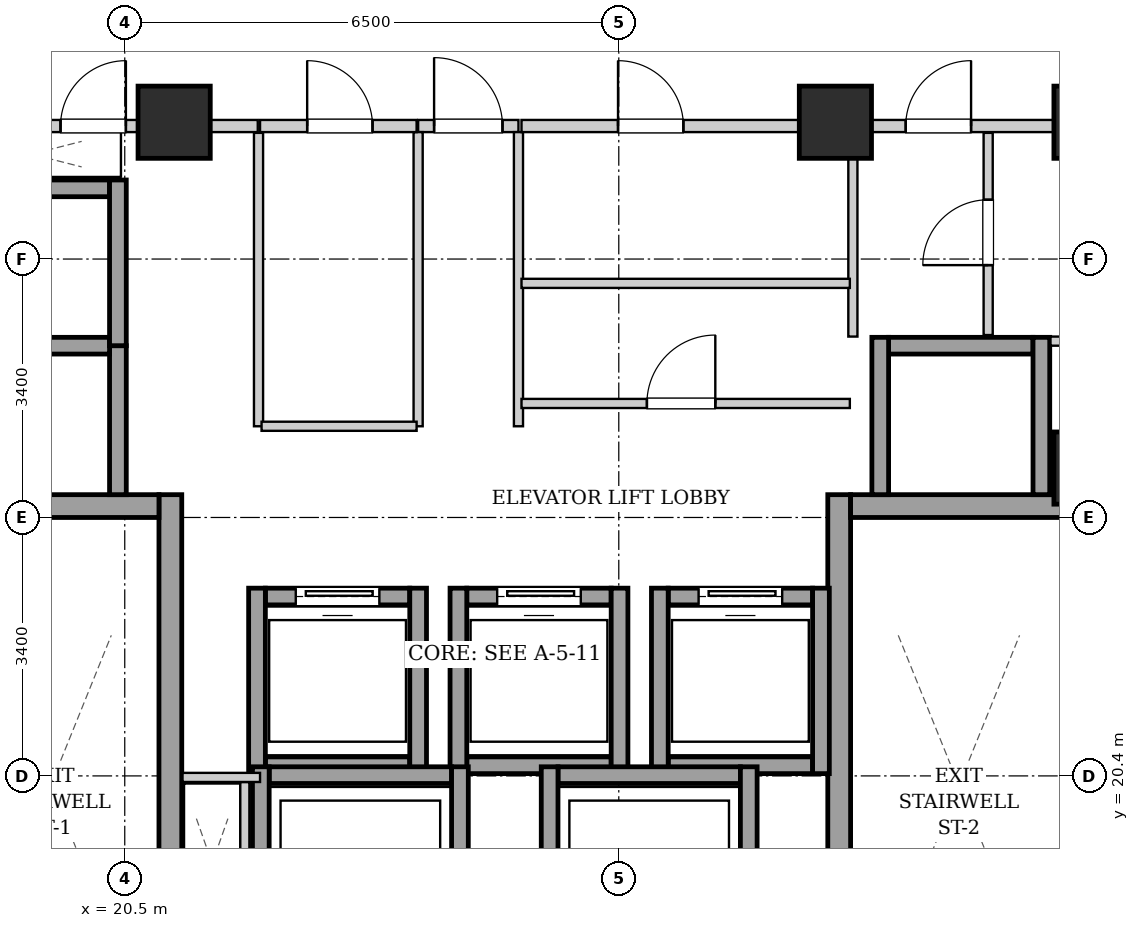
"""IFC4 building model, lengths in metres.
Left out: names, types, materials, properties, quantities, classifications, styles, units other than length and angle.
Written with IfcOpenShell. Run it as: python <this file> out.ifc"""

import sys

from ifc_helpers import new_model, si_unit, direction, frame, frame_2d, origin, origin_2d, place, context, subcontext, project, spatial, rectangle, extrude, element, fill, save


model = new_model("IFC4")
c1 = context("Model", 3, precision=1e-05, world=origin(), true_north=direction((0.0, 1.0)))
c2 = subcontext(c1, "Body", "Model", "MODEL_VIEW")
j1 = project(units=[si_unit("LENGTHUNIT", "METRE"), si_unit("PLANEANGLEUNIT", "RADIAN")], contexts=[c1])
p1 = place(None, origin())
s1 = spatial("IfcSite", under=j1, at=p1, CompositionType="ELEMENT")
p2 = place(p1, origin())
s2 = spatial("IfcBuilding", under=s1, at=p2, CompositionType="ELEMENT")
p3 = place(p2, frame((0.0, 0.0, 150.4)))
s3 = spatial("IfcBuildingStorey", under=s2, at=p3, CompositionType="ELEMENT", Elevation=150.4)
for number, where, z_axis, x_axis in (
    (1, (21.15, 29.0, 0.0), (0.0, 0.0, 1.0), (1.0, 0.0, 0.0)),
    (2, (29.85, 29.0, 0.0), (0.0, 0.0, 1.0), (1.0, 0.0, 0.0)),
    (3, (33.2, 29.0, 0.0), (0.0, 0.0, 1.0), (1.0, 0.0, 0.0)),
    (4, (33.2, 24.45, 0.0), (0.0, 0.0, 1.0), (1.0, 0.0, 0.0)),
):
    element("IfcColumn", number, at=place(p3, frame(where, z_axis=z_axis, x_axis=x_axis)), inside=s3, PredefinedType="COLUMN", context=c2, shape_type="SweptSolid", body=[
        extrude(rectangle(XDim=0.95, YDim=0.95, at=origin_2d()), origin(), (0.0, 0.0, 1.0), 3.25),
    ])
p4 = place(p3, frame((21.1, 15.1, 0.0), z_axis=(0.0, 0.0, 1.0), x_axis=(0.0, 1.0, 0.0)))
e5 = element("IfcWall", 5, at=p4, inside=s3, PredefinedType="SHEAR", context=c2, shape_type="SweptSolid", body=[
    extrude(rectangle(XDim=9.0, YDim=0.3, at=frame_2d((4.5, 0.0))), origin(), (0.0, 0.0, 1.0), 2.99),
])
p5 = place(p3, frame((18.1, 23.95, 0.0), z_axis=(0.0, 0.0, 1.0), x_axis=(1.0, 0.0, 0.0)))
e6 = element("IfcWall", 6, at=p5, inside=s3, PredefinedType="SHEAR", context=c2, shape_type="SweptSolid", body=[
    extrude(rectangle(XDim=2.85, YDim=0.3, at=frame_2d((1.425, 0.0))), origin(), (0.0, 0.0, 1.0), 2.99),
])
p6 = place(p3, frame((29.9, 15.1, 0.0), z_axis=(0.0, 0.0, 1.0), x_axis=(0.0, 1.0, 0.0)))
e7 = element("IfcWall", 7, at=p6, inside=s3, PredefinedType="SHEAR", context=c2, shape_type="SweptSolid", body=[
    extrude(rectangle(XDim=9.0, YDim=0.3, at=frame_2d((4.5, 0.0))), origin(), (0.0, 0.0, 1.0), 2.99),
])
p7 = place(p3, frame((30.05, 23.95, 0.0), z_axis=(0.0, 0.0, 1.0), x_axis=(1.0, 0.0, 0.0)))
e8 = element("IfcWall", 8, at=p7, inside=s3, PredefinedType="SHEAR", context=c2, shape_type="SweptSolid", body=[
    extrude(rectangle(XDim=2.85, YDim=0.3, at=frame_2d((1.425, 0.0))), origin(), (0.0, 0.0, 1.0), 2.99),
])
p8 = place(p3, frame((22.35, 20.54, 0.0), z_axis=(0.0, 0.0, 1.0), x_axis=(1.0, 0.0, 0.0)))
e9 = element("IfcWall", 9, at=p8, inside=s3, PredefinedType="SHEAR", context=c2, shape_type="SweptSolid", body=[
    extrude(rectangle(XDim=1.9, YDim=0.22, at=frame_2d((0.95, 0.0))), origin(), (0.0, 0.0, 1.0), 2.99),
])
p9 = place(p3, frame((22.35, 22.76, 0.0), z_axis=(0.0, 0.0, 1.0), x_axis=(1.0, 0.0, 0.0)))
e10 = element("IfcWall", 10, at=p9, inside=s3, PredefinedType="SHEAR", context=c2, shape_type="SweptSolid", body=[
    extrude(rectangle(XDim=1.9, YDim=0.22, at=frame_2d((0.95, 0.0))), origin(), (0.0, 0.0, 1.0), 2.99),
])
p10 = place(p9, frame((0.4, 0.0, 0.0)))
e11 = element("IfcOpeningElement", 11, at=p10, cuts=e10, PredefinedType="OPENING", context=c2, shape_type="SweptSolid", body=[
    extrude(rectangle(XDim=1.1, YDim=2.15, at=frame_2d((0.55, 1.075))), frame((0.0, 0.12, 0.0), z_axis=(0.0, -1.0, 0.0), x_axis=(1.0, 0.0, 0.0)), (0.0, 0.0, 1.0), 0.24),
])
for number, where, z_axis, x_axis in (
    (12, (22.24, 20.43, 0.0), (0.0, 0.0, 1.0), (0.0, 1.0, 0.0)),
    (13, (24.36, 20.43, 0.0), (0.0, 0.0, 1.0), (0.0, 1.0, 0.0)),
):
    element("IfcWall", number, at=place(p3, frame(where, z_axis=z_axis, x_axis=x_axis)), inside=s3, PredefinedType="SHEAR", context=c2, shape_type="SweptSolid", body=[
        extrude(rectangle(XDim=2.44, YDim=0.22, at=frame_2d((1.22, 0.0))), origin(), (0.0, 0.0, 1.0), 2.99),
    ])
p11 = place(p3, frame((25.0, 20.54, 0.0), z_axis=(0.0, 0.0, 1.0), x_axis=(1.0, 0.0, 0.0)))
e14 = element("IfcWall", 14, at=p11, inside=s3, PredefinedType="SHEAR", context=c2, shape_type="SweptSolid", body=[
    extrude(rectangle(XDim=1.9, YDim=0.22, at=frame_2d((0.95, 0.0))), origin(), (0.0, 0.0, 1.0), 2.99),
])
p12 = place(p3, frame((25.0, 22.76, 0.0), z_axis=(0.0, 0.0, 1.0), x_axis=(1.0, 0.0, 0.0)))
e15 = element("IfcWall", 15, at=p12, inside=s3, PredefinedType="SHEAR", context=c2, shape_type="SweptSolid", body=[
    extrude(rectangle(XDim=1.9, YDim=0.22, at=frame_2d((0.95, 0.0))), origin(), (0.0, 0.0, 1.0), 2.99),
])
p13 = place(p12, frame((0.4, 0.0, 0.0)))
e16 = element("IfcOpeningElement", 16, at=p13, cuts=e15, PredefinedType="OPENING", context=c2, shape_type="SweptSolid", body=[
    extrude(rectangle(XDim=1.1, YDim=2.15, at=frame_2d((0.55, 1.075))), frame((0.0, 0.12, 0.0), z_axis=(0.0, -1.0, 0.0), x_axis=(1.0, 0.0, 0.0)), (0.0, 0.0, 1.0), 0.24),
])
for number, where, z_axis, x_axis in (
    (17, (24.89, 20.43, 0.0), (0.0, 0.0, 1.0), (0.0, 1.0, 0.0)),
    (18, (27.01, 20.43, 0.0), (0.0, 0.0, 1.0), (0.0, 1.0, 0.0)),
):
    element("IfcWall", number, at=place(p3, frame(where, z_axis=z_axis, x_axis=x_axis)), inside=s3, PredefinedType="SHEAR", context=c2, shape_type="SweptSolid", body=[
        extrude(rectangle(XDim=2.44, YDim=0.22, at=frame_2d((1.22, 0.0))), origin(), (0.0, 0.0, 1.0), 2.99),
    ])
p14 = place(p3, frame((27.65, 20.54, 0.0), z_axis=(0.0, 0.0, 1.0), x_axis=(1.0, 0.0, 0.0)))
e19 = element("IfcWall", 19, at=p14, inside=s3, PredefinedType="SHEAR", context=c2, shape_type="SweptSolid", body=[
    extrude(rectangle(XDim=1.9, YDim=0.22, at=frame_2d((0.95, 0.0))), origin(), (0.0, 0.0, 1.0), 2.99),
])
p15 = place(p3, frame((27.65, 22.76, 0.0), z_axis=(0.0, 0.0, 1.0), x_axis=(1.0, 0.0, 0.0)))
e20 = element("IfcWall", 20, at=p15, inside=s3, PredefinedType="SHEAR", context=c2, shape_type="SweptSolid", body=[
    extrude(rectangle(XDim=1.9, YDim=0.22, at=frame_2d((0.95, 0.0))), origin(), (0.0, 0.0, 1.0), 2.99),
])
p16 = place(p15, frame((0.4, 0.0, 0.0)))
e21 = element("IfcOpeningElement", 21, at=p16, cuts=e20, PredefinedType="OPENING", context=c2, shape_type="SweptSolid", body=[
    extrude(rectangle(XDim=1.1, YDim=2.15, at=frame_2d((0.55, 1.075))), frame((0.0, 0.12, 0.0), z_axis=(0.0, -1.0, 0.0), x_axis=(1.0, 0.0, 0.0)), (0.0, 0.0, 1.0), 0.24),
])
for number, where, z_axis, x_axis in (
    (22, (27.54, 20.43, 0.0), (0.0, 0.0, 1.0), (0.0, 1.0, 0.0)),
    (23, (29.66, 20.43, 0.0), (0.0, 0.0, 1.0), (0.0, 1.0, 0.0)),
):
    element("IfcWall", number, at=place(p3, frame(where, z_axis=z_axis, x_axis=x_axis)), inside=s3, PredefinedType="SHEAR", context=c2, shape_type="SweptSolid", body=[
        extrude(rectangle(XDim=2.44, YDim=0.22, at=frame_2d((1.22, 0.0))), origin(), (0.0, 0.0, 1.0), 2.99),
    ])
p17 = place(p3, frame((20.41, 24.1, 0.0), z_axis=(0.0, 0.0, 1.0), x_axis=(0.0, 1.0, 0.0)))
e24 = element("IfcWall", 24, at=p17, inside=s3, PredefinedType="SHEAR", context=c2, shape_type="SweptSolid", body=[
    extrude(rectangle(XDim=1.96, YDim=0.22, at=frame_2d((0.98, 0.0))), origin(), (0.0, 0.0, 1.0), 2.99),
])
for number, where, z_axis, x_axis in (
    (25, (18.4, 26.06, 0.0), (0.0, 0.0, 1.0), (1.0, 0.0, 0.0)),
    (26, (18.4, 28.13, 0.0), (0.0, 0.0, 1.0), (1.0, 0.0, 0.0)),
):
    element("IfcWall", number, at=place(p3, frame(where, z_axis=z_axis, x_axis=x_axis)), inside=s3, PredefinedType="SHEAR", context=c2, shape_type="SweptSolid", body=[
        extrude(rectangle(XDim=1.9, YDim=0.22, at=frame_2d((0.95, 0.0))), origin(), (0.0, 0.0, 1.0), 2.99),
    ])
p18 = place(p3, frame((20.41, 26.06, 0.0), z_axis=(0.0, 0.0, 1.0), x_axis=(0.0, 1.0, 0.0)))
e27 = element("IfcWall", 27, at=p18, inside=s3, PredefinedType="SHEAR", context=c2, shape_type="SweptSolid", body=[
    extrude(rectangle(XDim=2.18, YDim=0.22, at=frame_2d((1.09, 0.0))), origin(), (0.0, 0.0, 1.0), 2.99),
])
p19 = place(p3, frame((30.55, 26.06, 0.0), z_axis=(0.0, 0.0, 1.0), x_axis=(1.0, 0.0, 0.0)))
e28 = element("IfcWall", 28, at=p19, inside=s3, PredefinedType="SHEAR", context=c2, shape_type="SweptSolid", body=[
    extrude(rectangle(XDim=1.9, YDim=0.22, at=frame_2d((0.95, 0.0))), origin(), (0.0, 0.0, 1.0), 2.99),
])
for number, where, z_axis, x_axis in (
    (29, (30.44, 24.1, 0.0), (0.0, 0.0, 1.0), (0.0, 1.0, 0.0)),
    (30, (32.56, 24.1, 0.0), (0.0, 0.0, 1.0), (0.0, 1.0, 0.0)),
):
    element("IfcWall", number, at=place(p3, frame(where, z_axis=z_axis, x_axis=x_axis)), inside=s3, PredefinedType="SHEAR", context=c2, shape_type="SweptSolid", body=[
        extrude(rectangle(XDim=2.07, YDim=0.22, at=frame_2d((1.035, 0.0))), origin(), (0.0, 0.0, 1.0), 2.99),
    ])
p20 = place(p3, frame((22.4, 20.41, 0.0), z_axis=(0.0, 0.0, 1.0), x_axis=(1.0, 0.0, 0.0)))
e31 = element("IfcWall", 31, at=p20, inside=s3, PredefinedType="SHEAR", context=c2, shape_type="SweptSolid", body=[
    extrude(rectangle(XDim=2.4, YDim=0.22, at=frame_2d((1.2, 0.0))), origin(), (0.0, 0.0, 1.0), 2.99),
])
for number, where, z_axis, x_axis in (
    (32, (22.29, 17.98, 0.0), (0.0, 0.0, 1.0), (0.0, 1.0, 0.0)),
    (33, (24.91, 17.98, 0.0), (0.0, 0.0, 1.0), (0.0, 1.0, 0.0)),
):
    element("IfcWall", number, at=place(p3, frame(where, z_axis=z_axis, x_axis=x_axis)), inside=s3, PredefinedType="SHEAR", context=c2, shape_type="SweptSolid", body=[
        extrude(rectangle(XDim=2.54, YDim=0.22, at=frame_2d((1.27, 0.0))), origin(), (0.0, 0.0, 1.0), 2.99),
    ])
p21 = place(p3, frame((26.2, 20.41, 0.0), z_axis=(0.0, 0.0, 1.0), x_axis=(1.0, 0.0, 0.0)))
e34 = element("IfcWall", 34, at=p21, inside=s3, PredefinedType="SHEAR", context=c2, shape_type="SweptSolid", body=[
    extrude(rectangle(XDim=2.4, YDim=0.22, at=frame_2d((1.2, 0.0))), origin(), (0.0, 0.0, 1.0), 2.99),
])
for number, where, z_axis, x_axis in (
    (35, (26.09, 17.98, 0.0), (0.0, 0.0, 1.0), (0.0, 1.0, 0.0)),
    (36, (28.71, 17.98, 0.0), (0.0, 0.0, 1.0), (0.0, 1.0, 0.0)),
):
    element("IfcWall", number, at=place(p3, frame(where, z_axis=z_axis, x_axis=x_axis)), inside=s3, PredefinedType="SHEAR", context=c2, shape_type="SweptSolid", body=[
        extrude(rectangle(XDim=2.54, YDim=0.22, at=frame_2d((1.27, 0.0))), origin(), (0.0, 0.0, 1.0), 2.99),
    ])
p22 = place(p3, frame((24.36, 28.95, 0.0), z_axis=(0.0, 0.0, 1.0), x_axis=(1.0, 0.0, 0.0)))
e37 = element("IfcWall", 37, at=p22, inside=s3, PredefinedType="PARTITIONING", context=c2, shape_type="SweptSolid", body=[
    extrude(rectangle(XDim=1.32, YDim=0.16, at=frame_2d((0.66, 0.0))), origin(), (0.0, 0.0, 1.0), 2.442),
])
p23 = place(p22, frame((0.21, 0.0, 0.0)))
e38 = element("IfcOpeningElement", 38, at=p23, cuts=e37, PredefinedType="OPENING", context=c2, shape_type="SweptSolid", body=[
    extrude(rectangle(XDim=0.9, YDim=2.05, at=frame_2d((0.45, 1.025))), frame((0.0, 0.09, 0.0), z_axis=(0.0, -1.0, 0.0), x_axis=(1.0, 0.0, 0.0)), (0.0, 0.0, 1.0), 0.18),
])
p24 = place(p3, frame((17.96, 28.95, 0.0), z_axis=(0.0, 0.0, 1.0), x_axis=(1.0, 0.0, 0.0)))
e39 = element("IfcWall", 39, at=p24, inside=s3, PredefinedType="PARTITIONING", context=c2, shape_type="SweptSolid", body=[
    extrude(rectangle(XDim=4.29, YDim=0.16, at=frame_2d((2.145, 0.0))), origin(), (0.0, 0.0, 1.0), 2.442),
])
p25 = place(p24, frame((1.695, 0.0, 0.0)))
e40 = element("IfcOpeningElement", 40, at=p25, cuts=e39, PredefinedType="OPENING", context=c2, shape_type="SweptSolid", body=[
    extrude(rectangle(XDim=0.86, YDim=2.05, at=frame_2d((0.43, 1.025))), frame((0.0, 0.09, 0.0), z_axis=(0.0, -1.0, 0.0), x_axis=(1.0, 0.0, 0.0)), (0.0, 0.0, 1.0), 0.18),
])
p26 = place(p3, frame((22.08, 18.2, 0.0), z_axis=(0.0, 0.0, 1.0), x_axis=(0.0, 1.0, 0.0)))
e41 = element("IfcWall", 41, at=p26, inside=s3, PredefinedType="PARTITIONING", context=c2, shape_type="SweptSolid", body=[
    extrude(rectangle(XDim=2.12, YDim=0.12, at=frame_2d((1.06, 0.0))), origin(), (0.0, 0.0, 1.0), 2.99),
])
p27 = place(p3, frame((22.28, 20.38, 0.0), z_axis=(0.0, 0.0, 1.0), x_axis=(-1.0, 0.0, 0.0)))
e42 = element("IfcWall", 42, at=p27, inside=s3, PredefinedType="PARTITIONING", context=c2, shape_type="SweptSolid", body=[
    extrude(rectangle(XDim=1.02, YDim=0.12, at=frame_2d((0.51, 0.0))), origin(), (0.0, 0.0, 1.0), 2.99),
])
for number, where, z_axis, x_axis in (
    (43, (24.36, 25.0, 0.0), (0.0, 0.0, 1.0), (0.0, 1.0, 0.0)),
    (44, (25.68, 25.0, 0.0), (0.0, 0.0, 1.0), (0.0, 1.0, 0.0)),
):
    element("IfcWall", number, at=place(p3, frame(where, z_axis=z_axis, x_axis=x_axis)), inside=s3, PredefinedType="PARTITIONING", context=c2, shape_type="SweptSolid", body=[
        extrude(rectangle(XDim=3.87, YDim=0.12, at=frame_2d((1.935, 0.0))), origin(), (0.0, 0.0, 1.0), 2.99),
    ])
p28 = place(p3, frame((30.08, 26.18, 0.0), z_axis=(0.0, 0.0, 1.0), x_axis=(0.0, 1.0, 0.0)))
e45 = element("IfcWall", 45, at=p28, inside=s3, PredefinedType="PARTITIONING", context=c2, shape_type="SweptSolid", body=[
    extrude(rectangle(XDim=2.68, YDim=0.12, at=frame_2d((1.34, 0.0))), origin(), (0.0, 0.0, 1.0), 2.99),
])
p29 = place(p3, frame((32.68, 26.12, 0.0), z_axis=(0.0, 0.0, 1.0), x_axis=(1.0, 0.0, 0.0)))
e46 = element("IfcWall", 46, at=p29, inside=s3, PredefinedType="PARTITIONING", context=c2, shape_type="SweptSolid", body=[
    extrude(rectangle(XDim=0.38, YDim=0.12, at=frame_2d((0.19, 0.0))), origin(), (0.0, 0.0, 1.0), 2.99),
])
p30 = place(p3, frame((31.86, 26.2, 0.0), z_axis=(0.0, 0.0, 1.0), x_axis=(0.0, 1.0, 0.0)))
e47 = element("IfcWall", 47, at=p30, inside=s3, PredefinedType="PARTITIONING", context=c2, shape_type="SweptSolid", body=[
    extrude(rectangle(XDim=2.66, YDim=0.12, at=frame_2d((1.33, 0.0))), origin(), (0.0, 0.0, 1.0), 2.99),
])
p31 = place(p30, frame((0.92, 0.0, 0.0)))
e48 = element("IfcOpeningElement", 48, at=p31, cuts=e47, PredefinedType="OPENING", context=c2, shape_type="SweptSolid", body=[
    extrude(rectangle(XDim=0.86, YDim=2.05, at=frame_2d((0.43, 1.025))), frame((0.0, 0.07, 0.0), z_axis=(0.0, -1.0, 0.0), x_axis=(1.0, 0.0, 0.0)), (0.0, 0.0, 1.0), 0.14),
])
p32 = place(p3, frame((30.08, 28.95, 0.0), z_axis=(0.0, 0.0, 1.0), x_axis=(1.0, 0.0, 0.0)))
e49 = element("IfcWall", 49, at=p32, inside=s3, PredefinedType="PARTITIONING", context=c2, shape_type="SweptSolid", body=[
    extrude(rectangle(XDim=2.96, YDim=0.16, at=frame_2d((1.48, 0.0))), origin(), (0.0, 0.0, 1.0), 2.99),
])
p33 = place(p32, frame((0.695, 0.0, 0.0)))
e50 = element("IfcOpeningElement", 50, at=p33, cuts=e49, PredefinedType="OPENING", context=c2, shape_type="SweptSolid", body=[
    extrude(rectangle(XDim=0.86, YDim=2.05, at=frame_2d((0.43, 1.025))), frame((0.0, 0.09, 0.0), z_axis=(0.0, -1.0, 0.0), x_axis=(1.0, 0.0, 0.0)), (0.0, 0.0, 1.0), 0.18),
])
p34 = place(p3, frame((22.26, 25.0, 0.0), z_axis=(0.0, 0.0, 1.0), x_axis=(0.0, 1.0, 0.0)))
e51 = element("IfcWall", 51, at=p34, inside=s3, PredefinedType="PARTITIONING", context=c2, shape_type="SweptSolid", body=[
    extrude(rectangle(XDim=3.86, YDim=0.12, at=frame_2d((1.93, 0.0))), origin(), (0.0, 0.0, 1.0), 2.99),
])
p35 = place(p3, frame((22.3, 25.0, 0.0), z_axis=(0.0, 0.0, 1.0), x_axis=(1.0, 0.0, 0.0)))
e52 = element("IfcWall", 52, at=p35, inside=s3, PredefinedType="PARTITIONING", context=c2, shape_type="SweptSolid", body=[
    extrude(rectangle(XDim=2.04, YDim=0.12, at=frame_2d((1.02, 0.0))), origin(), (0.0, 0.0, 1.0), 2.99),
])
p36 = place(p3, frame((22.28, 28.95, 0.0), z_axis=(0.0, 0.0, 1.0), x_axis=(1.0, 0.0, 0.0)))
e53 = element("IfcWall", 53, at=p36, inside=s3, PredefinedType="PARTITIONING", context=c2, shape_type="SweptSolid", body=[
    extrude(rectangle(XDim=2.06, YDim=0.16, at=frame_2d((1.03, 0.0))), origin(), (0.0, 0.0, 1.0), 2.442),
])
p37 = place(p36, frame((0.62, 0.0, 0.0)))
e54 = element("IfcOpeningElement", 54, at=p37, cuts=e53, PredefinedType="OPENING", context=c2, shape_type="SweptSolid", body=[
    extrude(rectangle(XDim=0.86, YDim=2.05, at=frame_2d((0.43, 1.025))), frame((0.0, 0.09, 0.0), z_axis=(0.0, -1.0, 0.0), x_axis=(1.0, 0.0, 0.0)), (0.0, 0.0, 1.0), 0.18),
])
p38 = place(p3, frame((25.72, 26.88, 0.0), z_axis=(0.0, 0.0, 1.0), x_axis=(1.0, 0.0, 0.0)))
e55 = element("IfcWall", 55, at=p38, inside=s3, PredefinedType="PARTITIONING", context=c2, shape_type="SweptSolid", body=[
    extrude(rectangle(XDim=4.32, YDim=0.12, at=frame_2d((2.16, 0.0))), origin(), (0.0, 0.0, 1.0), 2.99),
])
p39 = place(p3, frame((25.72, 25.3, 0.0), z_axis=(0.0, 0.0, 1.0), x_axis=(1.0, 0.0, 0.0)))
e56 = element("IfcWall", 56, at=p39, inside=s3, PredefinedType="PARTITIONING", context=c2, shape_type="SweptSolid", body=[
    extrude(rectangle(XDim=4.32, YDim=0.12, at=frame_2d((2.16, 0.0))), origin(), (0.0, 0.0, 1.0), 2.99),
])
p40 = place(p39, frame((1.65, 0.0, 0.0)))
e57 = element("IfcOpeningElement", 57, at=p40, cuts=e56, PredefinedType="OPENING", context=c2, shape_type="SweptSolid", body=[
    extrude(rectangle(XDim=0.9, YDim=2.05, at=frame_2d((0.45, 1.025))), frame((0.0, 0.07, 0.0), z_axis=(0.0, -1.0, 0.0), x_axis=(1.0, 0.0, 0.0)), (0.0, 0.0, 1.0), 0.14),
])
p41 = place(p3, frame((25.72, 28.95, 0.0), z_axis=(0.0, 0.0, 1.0), x_axis=(1.0, 0.0, 0.0)))
e58 = element("IfcWall", 58, at=p41, inside=s3, PredefinedType="PARTITIONING", context=c2, shape_type="SweptSolid", body=[
    extrude(rectangle(XDim=4.32, YDim=0.16, at=frame_2d((2.16, 0.0))), origin(), (0.0, 0.0, 1.0), 2.442),
])
p42 = place(p41, frame((1.27, 0.0, 0.0)))
e59 = element("IfcOpeningElement", 59, at=p42, cuts=e58, PredefinedType="OPENING", context=c2, shape_type="SweptSolid", body=[
    extrude(rectangle(XDim=0.86, YDim=2.05, at=frame_2d((0.43, 1.025))), frame((0.0, 0.09, 0.0), z_axis=(0.0, -1.0, 0.0), x_axis=(1.0, 0.0, 0.0)), (0.0, 0.0, 1.0), 0.18),
])
p43 = place(p10, origin())
e60 = element("IfcDoor", 60, at=p43, inside=s3, OperationType="SLIDING_TO_LEFT", PredefinedType="DOOR", context=c2, shape_type="SweptSolid", body=[
    extrude(rectangle(XDim=1.1, YDim=2.15, at=frame_2d((0.55, 1.075))), frame((0.0, 0.025, 0.0), z_axis=(0.0, -1.0, 0.0), x_axis=(1.0, 0.0, 0.0)), (0.0, 0.0, 1.0), 0.05),
])
fill(e11, e60)
p44 = place(p13, origin())
e61 = element("IfcDoor", 61, at=p44, inside=s3, OperationType="SLIDING_TO_LEFT", PredefinedType="DOOR", context=c2, shape_type="SweptSolid", body=[
    extrude(rectangle(XDim=1.1, YDim=2.15, at=frame_2d((0.55, 1.075))), frame((0.0, 0.025, 0.0), z_axis=(0.0, -1.0, 0.0), x_axis=(1.0, 0.0, 0.0)), (0.0, 0.0, 1.0), 0.05),
])
fill(e16, e61)
p45 = place(p16, origin())
e62 = element("IfcDoor", 62, at=p45, inside=s3, OperationType="SLIDING_TO_LEFT", PredefinedType="DOOR", context=c2, shape_type="SweptSolid", body=[
    extrude(rectangle(XDim=1.1, YDim=2.15, at=frame_2d((0.55, 1.075))), frame((0.0, 0.025, 0.0), z_axis=(0.0, -1.0, 0.0), x_axis=(1.0, 0.0, 0.0)), (0.0, 0.0, 1.0), 0.05),
])
fill(e21, e62)
p46 = place(p23, origin())
e63 = element("IfcDoor", 63, at=p46, inside=s3, OperationType="SINGLE_SWING_LEFT", PredefinedType="DOOR", context=c2, shape_type="SweptSolid", body=[
    extrude(rectangle(XDim=0.9, YDim=2.05, at=frame_2d((0.45, 1.025))), frame((0.0, 0.025, 0.0), z_axis=(0.0, -1.0, 0.0), x_axis=(1.0, 0.0, 0.0)), (0.0, 0.0, 1.0), 0.05),
])
fill(e38, e63)
p47 = place(p25, origin())
e64 = element("IfcDoor", 64, at=p47, inside=s3, OperationType="SINGLE_SWING_RIGHT", PredefinedType="DOOR", context=c2, shape_type="SweptSolid", body=[
    extrude(rectangle(XDim=0.86, YDim=2.05, at=frame_2d((0.43, 1.025))), frame((0.0, 0.025, 0.0), z_axis=(0.0, -1.0, 0.0), x_axis=(1.0, 0.0, 0.0)), (0.0, 0.0, 1.0), 0.05),
])
fill(e40, e64)
p48 = place(p31, origin())
e65 = element("IfcDoor", 65, at=p48, inside=s3, OperationType="SINGLE_SWING_LEFT", PredefinedType="DOOR", context=c2, shape_type="SweptSolid", body=[
    extrude(rectangle(XDim=0.86, YDim=2.05, at=frame_2d((0.43, 1.025))), frame((0.0, 0.025, 0.0), z_axis=(0.0, -1.0, 0.0), x_axis=(1.0, 0.0, 0.0)), (0.0, 0.0, 1.0), 0.05),
])
fill(e48, e65)
p49 = place(p33, origin())
e66 = element("IfcDoor", 66, at=p49, inside=s3, OperationType="SINGLE_SWING_RIGHT", PredefinedType="DOOR", context=c2, shape_type="SweptSolid", body=[
    extrude(rectangle(XDim=0.86, YDim=2.05, at=frame_2d((0.43, 1.025))), frame((0.0, 0.025, 0.0), z_axis=(0.0, -1.0, 0.0), x_axis=(1.0, 0.0, 0.0)), (0.0, 0.0, 1.0), 0.05),
])
fill(e50, e66)
p50 = place(p37, origin())
e67 = element("IfcDoor", 67, at=p50, inside=s3, OperationType="SINGLE_SWING_LEFT", PredefinedType="DOOR", context=c2, shape_type="SweptSolid", body=[
    extrude(rectangle(XDim=0.86, YDim=2.05, at=frame_2d((0.43, 1.025))), frame((0.0, 0.025, 0.0), z_axis=(0.0, -1.0, 0.0), x_axis=(1.0, 0.0, 0.0)), (0.0, 0.0, 1.0), 0.05),
])
fill(e54, e67)
p51 = place(p40, origin())
e68 = element("IfcDoor", 68, at=p51, inside=s3, OperationType="SINGLE_SWING_RIGHT", PredefinedType="DOOR", context=c2, shape_type="SweptSolid", body=[
    extrude(rectangle(XDim=0.9, YDim=2.05, at=frame_2d((0.45, 1.025))), frame((0.0, 0.025, 0.0), z_axis=(0.0, -1.0, 0.0), x_axis=(1.0, 0.0, 0.0)), (0.0, 0.0, 1.0), 0.05),
])
fill(e57, e68)
p52 = place(p42, origin())
e69 = element("IfcDoor", 69, at=p52, inside=s3, OperationType="SINGLE_SWING_LEFT", PredefinedType="DOOR", context=c2, shape_type="SweptSolid", body=[
    extrude(rectangle(XDim=0.86, YDim=2.05, at=frame_2d((0.43, 1.025))), frame((0.0, 0.025, 0.0), z_axis=(0.0, -1.0, 0.0), x_axis=(1.0, 0.0, 0.0)), (0.0, 0.0, 1.0), 0.05),
])
fill(e59, e69)
save(model, sys.argv[1])
